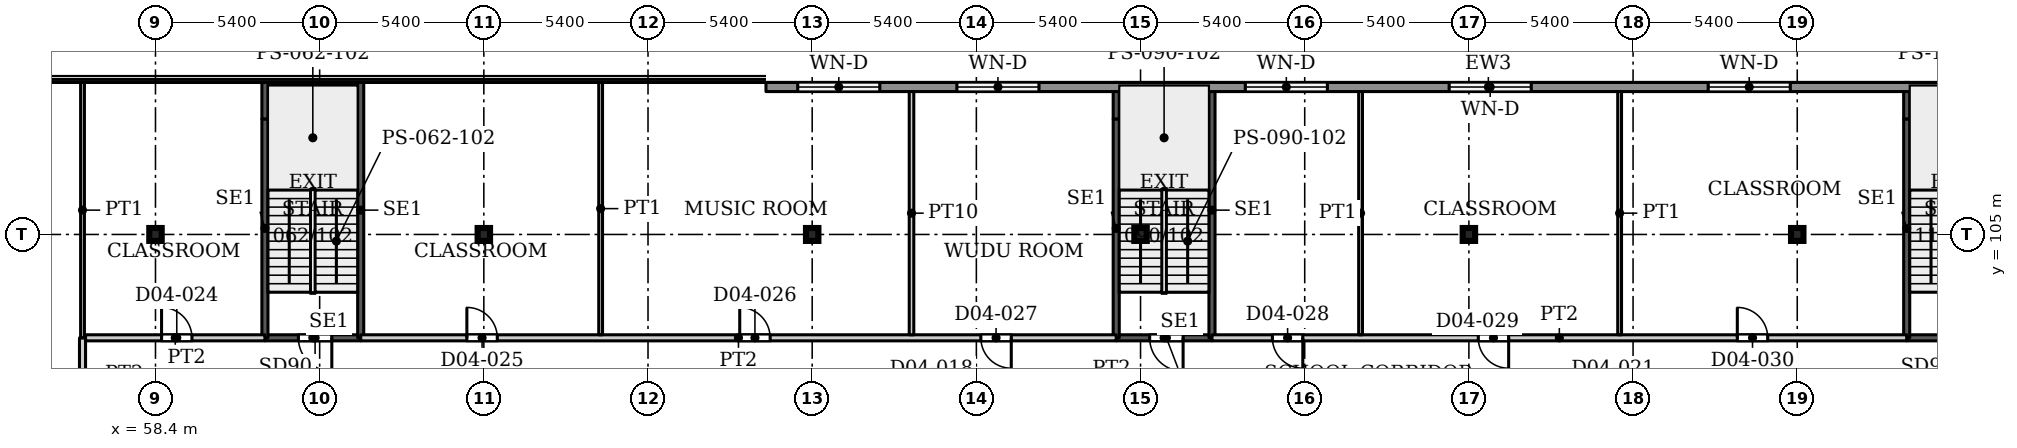
"""IFC4 building model, lengths in metres.
Left out: names, types, materials, properties, quantities, classifications, styles, units other than length and angle.
Written with IfcOpenShell. Run it as: python <this file> out.ifc"""

import sys

from ifc_helpers import new_model, si_unit, direction, frame, frame_2d, origin, origin_2d, place, context, subcontext, project, spatial, rectangle, i_section, extrude, source, transform, mapped, element, fill, save


model = new_model("IFC4")
c1 = context("Model", 3, precision=1e-05, world=origin(), true_north=direction((0.0, 1.0)))
c2 = subcontext(c1, "Body", "Model", "MODEL_VIEW")
j1 = project(units=[si_unit("LENGTHUNIT", "METRE"), si_unit("PLANEANGLEUNIT", "RADIAN")], contexts=[c1])
p1 = place(None, origin())
s1 = spatial("IfcSite", under=j1, at=p1, CompositionType="ELEMENT")
p2 = place(p1, origin())
s2 = spatial("IfcBuilding", under=s1, at=p2, CompositionType="ELEMENT")
p3 = place(p2, frame((0.0, 0.0, 21.5)))
s3 = spatial("IfcBuildingStorey", under=s2, at=p3, CompositionType="ELEMENT", Elevation=21.5)
for number, where, z_axis, x_axis in (
    (1, (58.4, 105.0, 0.0), (0.0, 0.0, 1.0), (1.0, 0.0, 0.0)),
    (2, (69.2, 105.0, 0.0), (0.0, 0.0, 1.0), (1.0, 0.0, 0.0)),
    (3, (80.0, 105.0, 0.0), (0.0, 0.0, 1.0), (1.0, 0.0, 0.0)),
    (4, (90.8, 105.0, 0.0), (0.0, 0.0, 1.0), (1.0, 0.0, 0.0)),
    (5, (101.6, 105.0, 0.0), (0.0, 0.0, 1.0), (1.0, 0.0, 0.0)),
    (6, (112.4, 105.0, 0.0), (0.0, 0.0, 1.0), (1.0, 0.0, 0.0)),
):
    element("IfcColumn", number, at=place(p3, frame(where, z_axis=z_axis, x_axis=x_axis)), inside=s3, PredefinedType="COLUMN", context=c2, shape_type="SweptSolid", body=[
        extrude(i_section(OverallWidth=0.409, OverallDepth=0.425, WebThickness=0.033, FlangeThickness=0.052, FilletRadius=0.013, at=origin_2d()), origin(), (0.0, 0.0, 1.0), 4.5),
    ])
p4 = place(p3, frame((78.48, 109.85, 0.0), z_axis=(0.0, 0.0, 1.0), x_axis=(1.0, 0.0, 0.0)))
e7 = element("IfcWall", 7, at=p4, inside=s3, PredefinedType="SOLIDWALL", context=c2, shape_type="SweptSolid", body=[
    extrude(rectangle(XDim=47.52, YDim=0.3, at=frame_2d((23.76, 0.0))), origin(), (0.0, 0.0, 1.0), 4.25),
])
p5 = place(p4, frame((1.045, 0.0, 0.9)))
e8 = element("IfcOpeningElement", 8, at=p5, cuts=e7, PredefinedType="OPENING", context=c2, shape_type="SweptSolid", body=[
    extrude(rectangle(XDim=2.7, YDim=2.1, at=frame_2d((1.35, 1.05))), frame((0.0, 0.16, 0.0), z_axis=(0.0, -1.0, 0.0), x_axis=(1.0, 0.0, 0.0)), (0.0, 0.0, 1.0), 0.32),
])
p6 = place(p4, frame((6.28, 0.0, 0.9)))
e9 = element("IfcOpeningElement", 9, at=p6, cuts=e7, PredefinedType="OPENING", context=c2, shape_type="SweptSolid", body=[
    extrude(rectangle(XDim=2.7, YDim=2.1, at=frame_2d((1.35, 1.05))), frame((0.0, 0.16, 0.0), z_axis=(0.0, -1.0, 0.0), x_axis=(1.0, 0.0, 0.0)), (0.0, 0.0, 1.0), 0.32),
])
p7 = place(p4, frame((15.765, 0.0, 0.9)))
e10 = element("IfcOpeningElement", 10, at=p7, cuts=e7, PredefinedType="OPENING", context=c2, shape_type="SweptSolid", body=[
    extrude(rectangle(XDim=2.7, YDim=2.1, at=frame_2d((1.35, 1.05))), frame((0.0, 0.16, 0.0), z_axis=(0.0, -1.0, 0.0), x_axis=(1.0, 0.0, 0.0)), (0.0, 0.0, 1.0), 0.32),
])
p8 = place(p4, frame((22.47, 0.0, 0.9)))
e11 = element("IfcOpeningElement", 11, at=p8, cuts=e7, PredefinedType="OPENING", context=c2, shape_type="SweptSolid", body=[
    extrude(rectangle(XDim=2.7, YDim=2.1, at=frame_2d((1.35, 1.05))), frame((0.0, 0.16, 0.0), z_axis=(0.0, -1.0, 0.0), x_axis=(1.0, 0.0, 0.0)), (0.0, 0.0, 1.0), 0.32),
])
p9 = place(p4, frame((30.99, 0.0, 0.9)))
e12 = element("IfcOpeningElement", 12, at=p9, cuts=e7, PredefinedType="OPENING", context=c2, shape_type="SweptSolid", body=[
    extrude(rectangle(XDim=2.7, YDim=2.1, at=frame_2d((1.35, 1.05))), frame((0.0, 0.16, 0.0), z_axis=(0.0, -1.0, 0.0), x_axis=(1.0, 0.0, 0.0)), (0.0, 0.0, 1.0), 0.32),
])
p10 = place(p4, frame((41.545, 0.0, 0.9)))
e13 = element("IfcOpeningElement", 13, at=p10, cuts=e7, PredefinedType="OPENING", context=c2, shape_type="SweptSolid", body=[
    extrude(rectangle(XDim=2.7, YDim=2.1, at=frame_2d((1.35, 1.05))), frame((0.0, 0.16, 0.0), z_axis=(0.0, -1.0, 0.0), x_axis=(1.0, 0.0, 0.0)), (0.0, 0.0, 1.0), 0.32),
])
p11 = place(p3, frame((62.0, 101.6, 0.0), z_axis=(0.0, 0.0, 1.0), x_axis=(1.0, 0.0, 0.0)))
e14 = element("IfcWall", 14, at=p11, inside=s3, PredefinedType="SHEAR", context=c2, shape_type="SweptSolid", body=[
    extrude(rectangle(XDim=3.15, YDim=0.2, at=frame_2d((1.575, 0.0))), origin(), (0.0, 0.0, 1.0), 4.5),
])
p12 = place(p11, frame((1.1, 0.0, 0.0)))
e15 = element("IfcOpeningElement", 15, at=p12, cuts=e14, PredefinedType="OPENING", context=c2, shape_type="SweptSolid", body=[
    extrude(rectangle(XDim=1.1, YDim=2.2, at=frame_2d((0.55, 1.1))), frame((0.0, 0.11, 0.0), z_axis=(0.0, -1.0, 0.0), x_axis=(1.0, 0.0, 0.0)), (0.0, 0.0, 1.0), 0.22),
])
p13 = place(p3, frame((62.0, 101.6, 0.0), z_axis=(0.0, 0.0, 1.0), x_axis=(0.0, 1.0, 0.0)))
e16 = element("IfcWall", 16, at=p13, inside=s3, PredefinedType="SHEAR", context=c2, shape_type="SweptSolid", body=[
    extrude(rectangle(XDim=7.2, YDim=0.2, at=frame_2d((3.6, 0.0))), origin(), (0.0, 0.0, 1.0), 4.5),
])
p14 = place(p3, frame((62.0, 108.8, 0.0), z_axis=(0.0, 0.0, 1.0), x_axis=(0.0, 1.0, 0.0)))
e17 = element("IfcWall", 17, at=p14, inside=s3, PredefinedType="SHEAR", context=c2, shape_type="SweptSolid", body=[
    extrude(rectangle(XDim=1.2, YDim=0.2, at=frame_2d((0.6, 0.0))), origin(), (0.0, 0.0, 1.0), 4.5),
])
p15 = place(p3, frame((65.15, 101.6, 0.0), z_axis=(0.0, 0.0, 1.0), x_axis=(0.0, 1.0, 0.0)))
e18 = element("IfcWall", 18, at=p15, inside=s3, PredefinedType="SHEAR", context=c2, shape_type="SweptSolid", body=[
    extrude(rectangle(XDim=8.4, YDim=0.2, at=frame_2d((4.2, 0.0))), origin(), (0.0, 0.0, 1.0), 4.5),
])
p16 = place(p3, frame((90.0, 101.6, 0.0), z_axis=(0.0, 0.0, 1.0), x_axis=(1.0, 0.0, 0.0)))
e19 = element("IfcWall", 19, at=p16, inside=s3, PredefinedType="SHEAR", context=c2, shape_type="SweptSolid", body=[
    extrude(rectangle(XDim=3.15, YDim=0.2, at=frame_2d((1.575, 0.0))), origin(), (0.0, 0.0, 1.0), 4.5),
])
p17 = place(p16, frame((1.1, 0.0, 0.0)))
e20 = element("IfcOpeningElement", 20, at=p17, cuts=e19, PredefinedType="OPENING", context=c2, shape_type="SweptSolid", body=[
    extrude(rectangle(XDim=1.1, YDim=2.2, at=frame_2d((0.55, 1.1))), frame((0.0, 0.11, 0.0), z_axis=(0.0, -1.0, 0.0), x_axis=(1.0, 0.0, 0.0)), (0.0, 0.0, 1.0), 0.22),
])
p18 = place(p3, frame((90.0, 101.6, 0.0), z_axis=(0.0, 0.0, 1.0), x_axis=(0.0, 1.0, 0.0)))
e21 = element("IfcWall", 21, at=p18, inside=s3, PredefinedType="SHEAR", context=c2, shape_type="SweptSolid", body=[
    extrude(rectangle(XDim=7.2, YDim=0.2, at=frame_2d((3.6, 0.0))), origin(), (0.0, 0.0, 1.0), 4.5),
])
p19 = place(p3, frame((90.0, 108.8, 0.0), z_axis=(0.0, 0.0, 1.0), x_axis=(0.0, 1.0, 0.0)))
e22 = element("IfcWall", 22, at=p19, inside=s3, PredefinedType="SHEAR", context=c2, shape_type="SweptSolid", body=[
    extrude(rectangle(XDim=1.2, YDim=0.2, at=frame_2d((0.6, 0.0))), origin(), (0.0, 0.0, 1.0), 4.5),
])
p20 = place(p3, frame((93.15, 101.6, 0.0), z_axis=(0.0, 0.0, 1.0), x_axis=(0.0, 1.0, 0.0)))
e23 = element("IfcWall", 23, at=p20, inside=s3, PredefinedType="SHEAR", context=c2, shape_type="SweptSolid", body=[
    extrude(rectangle(XDim=8.4, YDim=0.2, at=frame_2d((4.2, 0.0))), origin(), (0.0, 0.0, 1.0), 4.5),
])
p21 = place(p3, frame((116.0, 101.6, 0.0), z_axis=(0.0, 0.0, 1.0), x_axis=(1.0, 0.0, 0.0)))
e24 = element("IfcWall", 24, at=p21, inside=s3, PredefinedType="SHEAR", context=c2, shape_type="SweptSolid", body=[
    extrude(rectangle(XDim=3.15, YDim=0.2, at=frame_2d((1.575, 0.0))), origin(), (0.0, 0.0, 1.0), 4.5),
])
p22 = place(p21, frame((1.1, 0.0, 0.0)))
e25 = element("IfcOpeningElement", 25, at=p22, cuts=e24, PredefinedType="OPENING", context=c2, shape_type="SweptSolid", body=[
    extrude(rectangle(XDim=1.1, YDim=2.2, at=frame_2d((0.55, 1.1))), frame((0.0, 0.11, 0.0), z_axis=(0.0, -1.0, 0.0), x_axis=(1.0, 0.0, 0.0)), (0.0, 0.0, 1.0), 0.22),
])
p23 = place(p3, frame((116.0, 101.6, 0.0), z_axis=(0.0, 0.0, 1.0), x_axis=(0.0, 1.0, 0.0)))
e26 = element("IfcWall", 26, at=p23, inside=s3, PredefinedType="SHEAR", context=c2, shape_type="SweptSolid", body=[
    extrude(rectangle(XDim=7.2, YDim=0.2, at=frame_2d((3.6, 0.0))), origin(), (0.0, 0.0, 1.0), 4.5),
])
p24 = place(p3, frame((116.0, 108.8, 0.0), z_axis=(0.0, 0.0, 1.0), x_axis=(0.0, 1.0, 0.0)))
e27 = element("IfcWall", 27, at=p24, inside=s3, PredefinedType="SHEAR", context=c2, shape_type="SweptSolid", body=[
    extrude(rectangle(XDim=1.2, YDim=0.2, at=frame_2d((0.6, 0.0))), origin(), (0.0, 0.0, 1.0), 4.5),
])
p25 = place(p3, frame((56.0, 99.2, 0.0), z_axis=(0.0, 0.0, 1.0), x_axis=(0.0, 1.0, 0.0)))
e28 = element("IfcWall", 28, at=p25, inside=s3, PredefinedType="PARTITIONING", context=c2, shape_type="SweptSolid", body=[
    extrude(rectangle(XDim=2.4, YDim=0.2, at=frame_2d((1.2, 0.0))), origin(), (0.0, 0.0, 1.0), 4.18),
])
p26 = place(p3, frame((56.0, 101.6, 0.0), z_axis=(0.0, 0.0, 1.0), x_axis=(0.0, 1.0, 0.0)))
e29 = element("IfcWall", 29, at=p26, inside=s3, PredefinedType="PARTITIONING", context=c2, shape_type="SweptSolid", body=[
    extrude(rectangle(XDim=8.4, YDim=0.125, at=frame_2d((4.2, 0.0))), origin(), (0.0, 0.0, 1.0), 4.18),
])
p27 = place(p3, frame((56.1, 101.6, 0.0), z_axis=(0.0, 0.0, 1.0), x_axis=(1.0, 0.0, 0.0)))
e30 = element("IfcWall", 30, at=p27, inside=s3, PredefinedType="PARTITIONING", context=c2, shape_type="SweptSolid", body=[
    extrude(rectangle(XDim=5.9, YDim=0.2, at=frame_2d((2.95, 0.0))), origin(), (0.0, 0.0, 1.0), 4.18),
])
p28 = place(p27, frame((2.5, 0.0, 0.0)))
e31 = element("IfcOpeningElement", 31, at=p28, cuts=e30, PredefinedType="OPENING", context=c2, shape_type="SweptSolid", body=[
    extrude(rectangle(XDim=1.0, YDim=2.1, at=frame_2d((0.5, 1.05))), frame((0.0, 0.11, 0.0), z_axis=(0.0, -1.0, 0.0), x_axis=(1.0, 0.0, 0.0)), (0.0, 0.0, 1.0), 0.22),
])
p29 = place(p3, frame((65.15, 101.6, 0.0), z_axis=(0.0, 0.0, 1.0), x_axis=(1.0, 0.0, 0.0)))
e32 = element("IfcWall", 32, at=p29, inside=s3, PredefinedType="PARTITIONING", context=c2, shape_type="SweptSolid", body=[
    extrude(rectangle(XDim=24.85, YDim=0.2, at=frame_2d((12.425, 0.0))), origin(), (0.0, 0.0, 1.0), 4.18),
])
p30 = place(p29, frame((3.492, 0.0, 0.0)))
e33 = element("IfcOpeningElement", 33, at=p30, cuts=e32, PredefinedType="OPENING", context=c2, shape_type="SweptSolid", body=[
    extrude(rectangle(XDim=1.0, YDim=2.1, at=frame_2d((0.5, 1.05))), frame((0.0, 0.11, 0.0), z_axis=(0.0, -1.0, 0.0), x_axis=(1.0, 0.0, 0.0)), (0.0, 0.0, 1.0), 0.22),
])
p31 = place(p29, frame((12.467, 0.0, 0.0)))
e34 = element("IfcOpeningElement", 34, at=p31, cuts=e32, PredefinedType="OPENING", context=c2, shape_type="SweptSolid", body=[
    extrude(rectangle(XDim=1.0, YDim=2.1, at=frame_2d((0.5, 1.05))), frame((0.0, 0.11, 0.0), z_axis=(0.0, -1.0, 0.0), x_axis=(1.0, 0.0, 0.0)), (0.0, 0.0, 1.0), 0.22),
])
p32 = place(p29, frame((20.398, 0.0, 0.0)))
e35 = element("IfcOpeningElement", 35, at=p32, cuts=e32, PredefinedType="OPENING", context=c2, shape_type="SweptSolid", body=[
    extrude(rectangle(XDim=1.0, YDim=2.1, at=frame_2d((0.5, 1.05))), frame((0.0, 0.11, 0.0), z_axis=(0.0, -1.0, 0.0), x_axis=(1.0, 0.0, 0.0)), (0.0, 0.0, 1.0), 0.22),
])
p33 = place(p3, frame((73.042, 101.7, 0.0), z_axis=(0.0, 0.0, 1.0), x_axis=(0.0, 1.0, 0.0)))
e36 = element("IfcWall", 36, at=p33, inside=s3, PredefinedType="PARTITIONING", context=c2, shape_type="SweptSolid", body=[
    extrude(rectangle(XDim=8.3, YDim=0.125, at=frame_2d((4.15, 0.0))), origin(), (0.0, 0.0, 1.0), 4.18),
])
p34 = place(p3, frame((83.267, 101.7, 0.0), z_axis=(0.0, 0.0, 1.0), x_axis=(0.0, 1.0, 0.0)))
e37 = element("IfcWall", 37, at=p34, inside=s3, PredefinedType="PARTITIONING", context=c2, shape_type="SweptSolid", body=[
    extrude(rectangle(XDim=8.001, YDim=0.15, at=frame_2d((4.0, 0.0))), origin(), (0.0, 0.0, 1.0), 4.18),
])
p35 = place(p3, frame((93.15, 101.6, 0.0), z_axis=(0.0, 0.0, 1.0), x_axis=(1.0, 0.0, 0.0)))
e38 = element("IfcWall", 38, at=p35, inside=s3, PredefinedType="PARTITIONING", context=c2, shape_type="SweptSolid", body=[
    extrude(rectangle(XDim=22.85, YDim=0.2, at=frame_2d((11.425, 0.0))), origin(), (0.0, 0.0, 1.0), 4.18),
])
p36 = place(p35, frame((1.987, 0.0, 0.0)))
e39 = element("IfcOpeningElement", 39, at=p36, cuts=e38, PredefinedType="OPENING", context=c2, shape_type="SweptSolid", body=[
    extrude(rectangle(XDim=1.0, YDim=2.1, at=frame_2d((0.5, 1.05))), frame((0.0, 0.11, 0.0), z_axis=(0.0, -1.0, 0.0), x_axis=(1.0, 0.0, 0.0)), (0.0, 0.0, 1.0), 0.22),
])
p37 = place(p35, frame((8.758, 0.0, 0.0)))
e40 = element("IfcOpeningElement", 40, at=p37, cuts=e38, PredefinedType="OPENING", context=c2, shape_type="SweptSolid", body=[
    extrude(rectangle(XDim=1.0, YDim=2.1, at=frame_2d((0.5, 1.05))), frame((0.0, 0.11, 0.0), z_axis=(0.0, -1.0, 0.0), x_axis=(1.0, 0.0, 0.0)), (0.0, 0.0, 1.0), 0.22),
])
p38 = place(p35, frame((17.279, 0.0, 0.0)))
e41 = element("IfcOpeningElement", 41, at=p38, cuts=e38, PredefinedType="OPENING", context=c2, shape_type="SweptSolid", body=[
    extrude(rectangle(XDim=1.0, YDim=2.1, at=frame_2d((0.5, 1.05))), frame((0.0, 0.11, 0.0), z_axis=(0.0, -1.0, 0.0), x_axis=(1.0, 0.0, 0.0)), (0.0, 0.0, 1.0), 0.22),
])
for number, where, z_axis, x_axis in (
    (42, (98.037, 101.7, 0.0), (0.0, 0.0, 1.0), (0.0, 1.0, 0.0)),
    (43, (106.558, 101.7, 0.0), (0.0, 0.0, 1.0), (0.0, 1.0, 0.0)),
):
    element("IfcWall", number, at=place(p3, frame(where, z_axis=z_axis, x_axis=x_axis)), inside=s3, PredefinedType="PARTITIONING", context=c2, shape_type="SweptSolid", body=[
        extrude(rectangle(XDim=8.001, YDim=0.125, at=frame_2d((4.0, 0.0))), origin(), (0.0, 0.0, 1.0), 4.18),
    ])
m1 = source(origin(), c2, "Body", "SweptSolid", [
    extrude(rectangle(XDim=2.7, YDim=2.1, at=frame_2d((1.35, 1.05))), frame((0.0, 0.03, 0.0), z_axis=(0.0, -1.0, 0.0), x_axis=(1.0, 0.0, 0.0)), (0.0, 0.0, 1.0), 0.06),
])
p39 = place(p5, origin())
e44 = element("IfcWindow", 44, at=p39, inside=s3, PartitioningType="SINGLE_PANEL", PredefinedType="WINDOW", context=c2, shape_type="MappedRepresentation", body=[
    mapped(m1, transform((0.0, 0.0, 0.0), x_axis=(1.0, 0.0, 0.0), y_axis=(0.0, 1.0, 0.0), z_axis=(0.0, 0.0, 1.0), scale=1.0)),
])
fill(e8, e44)
p40 = place(p6, origin())
e45 = element("IfcWindow", 45, at=p40, inside=s3, PartitioningType="SINGLE_PANEL", PredefinedType="WINDOW", context=c2, shape_type="MappedRepresentation", body=[
    mapped(m1, transform((0.0, 0.0, 0.0), x_axis=(1.0, 0.0, 0.0), y_axis=(0.0, 1.0, 0.0), z_axis=(0.0, 0.0, 1.0), scale=1.0)),
])
fill(e9, e45)
p41 = place(p7, origin())
e46 = element("IfcWindow", 46, at=p41, inside=s3, PartitioningType="SINGLE_PANEL", PredefinedType="WINDOW", context=c2, shape_type="MappedRepresentation", body=[
    mapped(m1, transform((0.0, 0.0, 0.0), x_axis=(1.0, 0.0, 0.0), y_axis=(0.0, 1.0, 0.0), z_axis=(0.0, 0.0, 1.0), scale=1.0)),
])
fill(e10, e46)
p42 = place(p8, origin())
e47 = element("IfcWindow", 47, at=p42, inside=s3, PartitioningType="SINGLE_PANEL", PredefinedType="WINDOW", context=c2, shape_type="MappedRepresentation", body=[
    mapped(m1, transform((0.0, 0.0, 0.0), x_axis=(1.0, 0.0, 0.0), y_axis=(0.0, 1.0, 0.0), z_axis=(0.0, 0.0, 1.0), scale=1.0)),
])
fill(e11, e47)
p43 = place(p9, origin())
e48 = element("IfcWindow", 48, at=p43, inside=s3, PartitioningType="SINGLE_PANEL", PredefinedType="WINDOW", context=c2, shape_type="MappedRepresentation", body=[
    mapped(m1, transform((0.0, 0.0, 0.0), x_axis=(1.0, 0.0, 0.0), y_axis=(0.0, 1.0, 0.0), z_axis=(0.0, 0.0, 1.0), scale=1.0)),
])
fill(e12, e48)
m2 = source(origin(), c2, "Body", "SweptSolid", [
    extrude(rectangle(XDim=1.1, YDim=2.2, at=frame_2d((0.55, 1.1))), frame((0.0, 0.025, 0.0), z_axis=(0.0, -1.0, 0.0), x_axis=(1.0, 0.0, 0.0)), (0.0, 0.0, 1.0), 0.05),
])
p44 = place(p12, origin())
e49 = element("IfcDoor", 49, at=p44, inside=s3, OperationType="SINGLE_SWING_RIGHT", PredefinedType="DOOR", context=c2, shape_type="MappedRepresentation", body=[
    mapped(m2, transform((0.0, 0.0, 0.0), x_axis=(1.0, 0.0, 0.0), y_axis=(0.0, 1.0, 0.0), z_axis=(0.0, 0.0, 1.0), scale=1.0)),
])
fill(e15, e49)
p45 = place(p17, origin())
e50 = element("IfcDoor", 50, at=p45, inside=s3, OperationType="SINGLE_SWING_RIGHT", PredefinedType="DOOR", context=c2, shape_type="MappedRepresentation", body=[
    mapped(m2, transform((0.0, 0.0, 0.0), x_axis=(1.0, 0.0, 0.0), y_axis=(0.0, 1.0, 0.0), z_axis=(0.0, 0.0, 1.0), scale=1.0)),
])
fill(e20, e50)
m3 = source(origin(), c2, "Body", "SweptSolid", [
    extrude(rectangle(XDim=1.0, YDim=2.1, at=frame_2d((0.5, 1.05))), frame((0.0, 0.025, 0.0), z_axis=(0.0, -1.0, 0.0), x_axis=(1.0, 0.0, 0.0)), (0.0, 0.0, 1.0), 0.05),
])
p46 = place(p28, origin())
e51 = element("IfcDoor", 51, at=p46, inside=s3, OperationType="SINGLE_SWING_LEFT", PredefinedType="DOOR", context=c2, shape_type="MappedRepresentation", body=[
    mapped(m3, transform((0.0, 0.0, 0.0), x_axis=(1.0, 0.0, 0.0), y_axis=(0.0, 1.0, 0.0), z_axis=(0.0, 0.0, 1.0), scale=1.0)),
])
fill(e31, e51)
p47 = place(p30, origin())
e52 = element("IfcDoor", 52, at=p47, inside=s3, OperationType="SINGLE_SWING_LEFT", PredefinedType="DOOR", context=c2, shape_type="MappedRepresentation", body=[
    mapped(m3, transform((0.0, 0.0, 0.0), x_axis=(1.0, 0.0, 0.0), y_axis=(0.0, 1.0, 0.0), z_axis=(0.0, 0.0, 1.0), scale=1.0)),
])
fill(e33, e52)
p48 = place(p31, origin())
e53 = element("IfcDoor", 53, at=p48, inside=s3, OperationType="SINGLE_SWING_LEFT", PredefinedType="DOOR", context=c2, shape_type="MappedRepresentation", body=[
    mapped(m3, transform((0.0, 0.0, 0.0), x_axis=(1.0, 0.0, 0.0), y_axis=(0.0, 1.0, 0.0), z_axis=(0.0, 0.0, 1.0), scale=1.0)),
])
fill(e34, e53)
p49 = place(p32, origin())
e54 = element("IfcDoor", 54, at=p49, inside=s3, OperationType="SINGLE_SWING_RIGHT", PredefinedType="DOOR", context=c2, shape_type="MappedRepresentation", body=[
    mapped(m3, transform((0.0, 0.0, 0.0), x_axis=(1.0, 0.0, 0.0), y_axis=(0.0, 1.0, 0.0), z_axis=(0.0, 0.0, 1.0), scale=1.0)),
])
fill(e35, e54)
p50 = place(p36, origin())
e55 = element("IfcDoor", 55, at=p50, inside=s3, OperationType="SINGLE_SWING_RIGHT", PredefinedType="DOOR", context=c2, shape_type="MappedRepresentation", body=[
    mapped(m3, transform((0.0, 0.0, 0.0), x_axis=(1.0, 0.0, 0.0), y_axis=(0.0, 1.0, 0.0), z_axis=(0.0, 0.0, 1.0), scale=1.0)),
])
fill(e39, e55)
p51 = place(p37, origin())
e56 = element("IfcDoor", 56, at=p51, inside=s3, OperationType="SINGLE_SWING_RIGHT", PredefinedType="DOOR", context=c2, shape_type="MappedRepresentation", body=[
    mapped(m3, transform((0.0, 0.0, 0.0), x_axis=(1.0, 0.0, 0.0), y_axis=(0.0, 1.0, 0.0), z_axis=(0.0, 0.0, 1.0), scale=1.0)),
])
fill(e40, e56)
p52 = place(p38, origin())
e57 = element("IfcDoor", 57, at=p52, inside=s3, OperationType="SINGLE_SWING_LEFT", PredefinedType="DOOR", context=c2, shape_type="MappedRepresentation", body=[
    mapped(m3, transform((0.0, 0.0, 0.0), x_axis=(1.0, 0.0, 0.0), y_axis=(0.0, 1.0, 0.0), z_axis=(0.0, 0.0, 1.0), scale=1.0)),
])
fill(e41, e57)
save(model, sys.argv[1])
